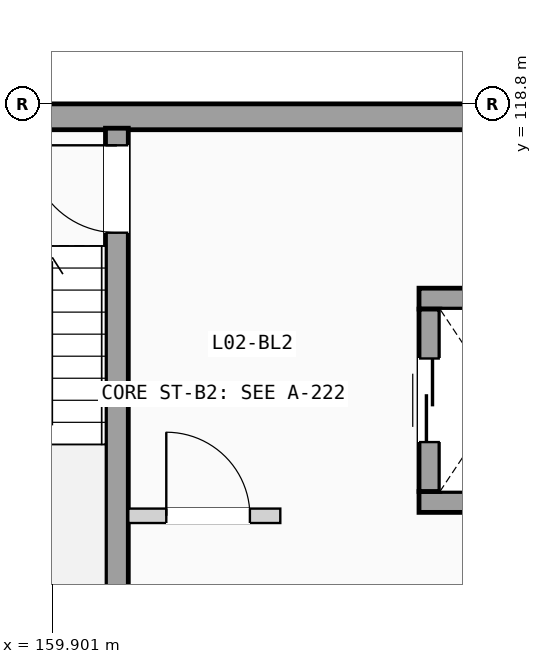
"""IFC4 building model, lengths in metres.
Left out: names, types, materials, properties, quantities, classifications, styles, units other than length and angle.
Written with IfcOpenShell. Run it as: python <this file> out.ifc"""

import sys

from ifc_helpers import new_model, si_unit, direction, frame, frame_2d, origin, place, context, subcontext, project, spatial, rectangle, extrude, element, fill, save


model = new_model("IFC4")
c1 = context("Model", 3, precision=1e-05, world=origin(), true_north=direction((0.0, 1.0)))
c2 = subcontext(c1, "Body", "Model", "MODEL_VIEW")
j1 = project(units=[si_unit("LENGTHUNIT", "METRE"), si_unit("PLANEANGLEUNIT", "RADIAN")], contexts=[c1])
p1 = place(None, origin())
s1 = spatial("IfcSite", under=j1, at=p1, CompositionType="ELEMENT")
p2 = place(p1, origin())
s2 = spatial("IfcBuilding", under=s1, at=p2, CompositionType="ELEMENT")
p3 = place(p2, frame((0.0, 0.0, 8.575)))
s3 = spatial("IfcBuildingStorey", under=s2, at=p3, CompositionType="ELEMENT", Elevation=8.575)
p4 = place(p3, frame((151.2, 118.63, 0.0), z_axis=(0.0, 0.0, 1.0), x_axis=(1.0, 0.0, 0.0)))
e1 = element("IfcWall", 1, at=p4, inside=s3, PredefinedType="SOLIDWALL", context=c2, shape_type="SweptSolid", body=[
    extrude(rectangle(XDim=21.6, YDim=0.34, at=frame_2d((10.8, 0.0))), origin(), (0.0, 0.0, 1.0), 3.24),
])
p5 = place(p3, frame((160.75, 111.48, 0.0), z_axis=(0.0, 0.0, 1.0), x_axis=(0.0, 1.0, 0.0)))
e2 = element("IfcWall", 2, at=p5, inside=s3, PredefinedType="SHEAR", context=c2, shape_type="SweptSolid", body=[
    extrude(rectangle(XDim=7.0, YDim=0.3, at=frame_2d((3.5, 0.0))), origin(), (0.0, 0.0, 1.0), 3.24),
])
p6 = place(p5, frame((5.625, 0.0, 0.0)))
e3 = element("IfcOpeningElement", 3, at=p6, cuts=e2, PredefinedType="OPENING", context=c2, shape_type="SweptSolid", body=[
    extrude(rectangle(XDim=1.15, YDim=2.12, at=frame_2d((0.575, 1.06))), frame((0.0, 0.16, 0.0), z_axis=(0.0, -1.0, 0.0), x_axis=(1.0, 0.0, 0.0)), (0.0, 0.0, 1.0), 0.32),
])
for number, where, z_axis, x_axis in (
    (4, (164.725, 113.562, 0.0), (0.0, 0.0, 1.0), (1.0, 0.0, 0.0)),
    (5, (164.725, 116.238, 0.0), (0.0, 0.0, 1.0), (1.0, 0.0, 0.0)),
):
    element("IfcWall", number, at=place(p3, frame(where, z_axis=z_axis, x_axis=x_axis)), inside=s3, PredefinedType="SHEAR", context=c2, shape_type="SweptSolid", body=[
        extrude(rectangle(XDim=2.15, YDim=0.275, at=frame_2d((1.075, 0.0))), origin(), (0.0, 0.0, 1.0), 3.24),
    ])
p7 = place(p3, frame((164.863, 113.7, 0.0), z_axis=(0.0, 0.0, 1.0), x_axis=(0.0, 1.0, 0.0)))
e6 = element("IfcWall", 6, at=p7, inside=s3, PredefinedType="SHEAR", context=c2, shape_type="SweptSolid", body=[
    extrude(rectangle(XDim=2.4, YDim=0.275, at=frame_2d((1.2, 0.0))), origin(), (0.0, 0.0, 1.0), 3.24),
])
p8 = place(p7, frame((0.65, 0.0, 0.0)))
e7 = element("IfcOpeningElement", 7, at=p8, cuts=e6, PredefinedType="OPENING", context=c2, shape_type="SweptSolid", body=[
    extrude(rectangle(XDim=1.1, YDim=2.15, at=frame_2d((0.55, 1.075))), frame((0.0, 0.147, 0.0), z_axis=(0.0, -1.0, 0.0), x_axis=(1.0, 0.0, 0.0)), (0.0, 0.0, 1.0), 0.295),
])
p9 = place(p3, frame((160.9, 113.38, 0.0), z_axis=(0.0, 0.0, 1.0), x_axis=(1.0, 0.0, 0.0)))
e8 = element("IfcWall", 8, at=p9, inside=s3, PredefinedType="PARTITIONING", context=c2, shape_type="SweptSolid", body=[
    extrude(rectangle(XDim=2.0, YDim=0.19, at=frame_2d((1.0, 0.0))), origin(), (0.0, 0.0, 1.0), 3.22),
])
p10 = place(p9, frame((0.5, 0.0, 0.0)))
e9 = element("IfcOpeningElement", 9, at=p10, cuts=e8, PredefinedType="OPENING", context=c2, shape_type="SweptSolid", body=[
    extrude(rectangle(XDim=1.1, YDim=2.12, at=frame_2d((0.55, 1.06))), frame((0.0, 0.105, 0.0), z_axis=(0.0, -1.0, 0.0), x_axis=(1.0, 0.0, 0.0)), (0.0, 0.0, 1.0), 0.21),
])
p11 = place(p6, origin())
e10 = element("IfcDoor", 10, at=p11, inside=s3, OperationType="SINGLE_SWING_RIGHT", PredefinedType="DOOR", context=c2, shape_type="SweptSolid", body=[
    extrude(rectangle(XDim=1.15, YDim=2.12, at=frame_2d((0.575, 1.06))), frame((0.0, 0.025, 0.0), z_axis=(0.0, -1.0, 0.0), x_axis=(1.0, 0.0, 0.0)), (0.0, 0.0, 1.0), 0.05),
])
fill(e3, e10)
p12 = place(p8, origin())
e11 = element("IfcDoor", 11, at=p12, inside=s3, OperationType="SLIDING_TO_LEFT", PredefinedType="DOOR", context=c2, shape_type="SweptSolid", body=[
    extrude(rectangle(XDim=1.1, YDim=2.15, at=frame_2d((0.55, 1.075))), frame((0.0, 0.025, 0.0), z_axis=(0.0, -1.0, 0.0), x_axis=(1.0, 0.0, 0.0)), (0.0, 0.0, 1.0), 0.05),
])
fill(e7, e11)
p13 = place(p10, origin())
e12 = element("IfcDoor", 12, at=p13, inside=s3, OperationType="SINGLE_SWING_LEFT", PredefinedType="DOOR", context=c2, shape_type="SweptSolid", body=[
    extrude(rectangle(XDim=1.1, YDim=2.12, at=frame_2d((0.55, 1.06))), frame((0.0, 0.025, 0.0), z_axis=(0.0, -1.0, 0.0), x_axis=(1.0, 0.0, 0.0)), (0.0, 0.0, 1.0), 0.05),
])
fill(e9, e12)
save(model, sys.argv[1])
